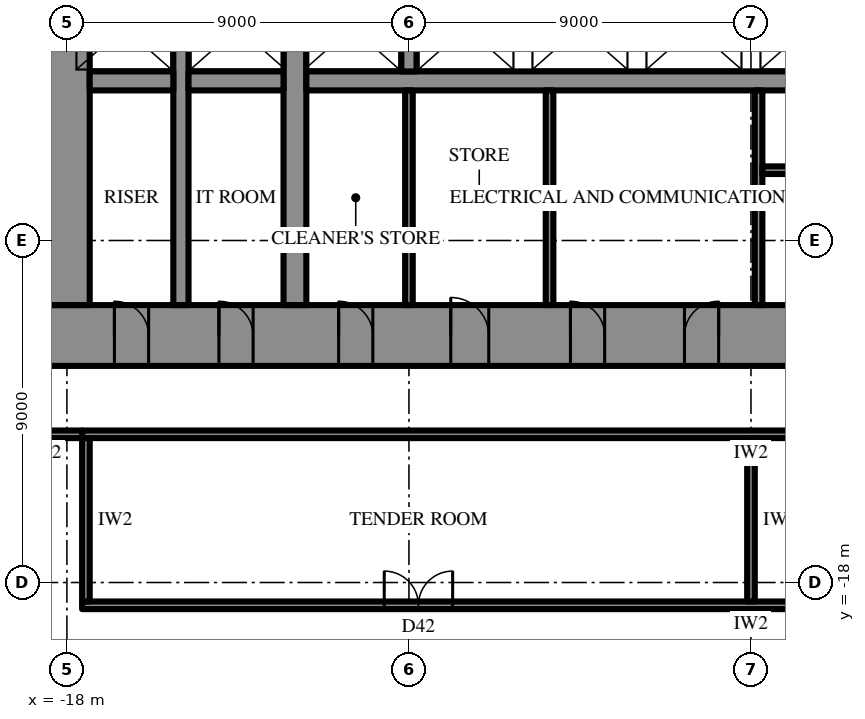
"""IFC4 building model, lengths in metres.
Left out: names, types, materials, properties, quantities, classifications, styles, units other than length and angle.
Written with IfcOpenShell. Run it as: python <this file> out.ifc"""

import sys

from ifc_helpers import new_model, si_unit, direction, frame, frame_2d, origin, place, context, subcontext, project, spatial, rectangle, extrude, element, fill, save


model = new_model("IFC4")
c1 = context("Model", 3, precision=1e-05, world=origin(), true_north=direction((0.0, 1.0)))
c2 = subcontext(c1, "Body", "Model", "MODEL_VIEW")
j1 = project(units=[si_unit("LENGTHUNIT", "METRE"), si_unit("PLANEANGLEUNIT", "RADIAN")], contexts=[c1])
p1 = place(None, origin())
s1 = spatial("IfcSite", under=j1, at=p1, CompositionType="ELEMENT")
p2 = place(p1, origin())
s2 = spatial("IfcBuilding", under=s1, at=p2, CompositionType="ELEMENT")
p3 = place(p2, frame((0.0, 0.0, 69.7)))
s3 = spatial("IfcBuildingStorey", under=s2, at=p3, CompositionType="ELEMENT", Elevation=69.7)
p4 = place(p3, frame((18.6, -11.5, 0.0), z_axis=(0.0, 0.0, 1.0), x_axis=(-1.0, 0.0, 0.0)))
e1 = element("IfcWall", 1, at=p4, inside=s3, PredefinedType="SHEAR", context=c2, shape_type="SweptSolid", body=[
    extrude(rectangle(XDim=37.2, YDim=1.6, at=frame_2d((18.6, 0.0))), origin(), (0.0, 0.0, 1.0), 4.2),
])
p5 = place(p4, frame((19.45, 0.0, 0.0)))
e2 = element("IfcOpeningElement", 2, at=p5, cuts=e1, PredefinedType="OPENING", context=c2, shape_type="SweptSolid", body=[
    extrude(rectangle(XDim=0.9, YDim=2.2, at=frame_2d((0.45, 1.1))), frame((0.0, 0.81, 0.0), z_axis=(0.0, -1.0, 0.0), x_axis=(1.0, 0.0, 0.0)), (0.0, 0.0, 1.0), 1.62),
])
p6 = place(p4, frame((22.45, 0.0, 0.0)))
e3 = element("IfcOpeningElement", 3, at=p6, cuts=e1, PredefinedType="OPENING", context=c2, shape_type="SweptSolid", body=[
    extrude(rectangle(XDim=0.9, YDim=2.2, at=frame_2d((0.45, 1.1))), frame((0.0, 0.81, 0.0), z_axis=(0.0, -1.0, 0.0), x_axis=(1.0, 0.0, 0.0)), (0.0, 0.0, 1.0), 1.62),
])
p7 = place(p4, frame((25.5, 0.0, 0.0)))
e4 = element("IfcOpeningElement", 4, at=p7, cuts=e1, PredefinedType="OPENING", context=c2, shape_type="SweptSolid", body=[
    extrude(rectangle(XDim=1.0, YDim=2.2, at=frame_2d((0.5, 1.1))), frame((0.0, 0.81, 0.0), z_axis=(0.0, -1.0, 0.0), x_axis=(1.0, 0.0, 0.0)), (0.0, 0.0, 1.0), 1.62),
])
p8 = place(p4, frame((1.85, 0.0, 0.0)))
e5 = element("IfcOpeningElement", 5, at=p8, cuts=e1, PredefinedType="OPENING", context=c2, shape_type="SweptSolid", body=[
    extrude(rectangle(XDim=0.9, YDim=2.2, at=frame_2d((0.45, 1.1))), frame((0.0, 0.81, 0.0), z_axis=(0.0, -1.0, 0.0), x_axis=(1.0, 0.0, 0.0)), (0.0, 0.0, 1.0), 1.62),
])
p9 = place(p4, frame((4.6, 0.0, 0.0)))
e6 = element("IfcOpeningElement", 6, at=p9, cuts=e1, PredefinedType="OPENING", context=c2, shape_type="SweptSolid", body=[
    extrude(rectangle(XDim=0.9, YDim=2.2, at=frame_2d((0.45, 1.1))), frame((0.0, 0.81, 0.0), z_axis=(0.0, -1.0, 0.0), x_axis=(1.0, 0.0, 0.0)), (0.0, 0.0, 1.0), 1.62),
])
p10 = place(p4, frame((7.75, 0.0, 0.0)))
e7 = element("IfcOpeningElement", 7, at=p10, cuts=e1, PredefinedType="OPENING", context=c2, shape_type="SweptSolid", body=[
    extrude(rectangle(XDim=0.9, YDim=2.2, at=frame_2d((0.45, 1.1))), frame((0.0, 0.81, 0.0), z_axis=(0.0, -1.0, 0.0), x_axis=(1.0, 0.0, 0.0)), (0.0, 0.0, 1.0), 1.62),
])
p11 = place(p4, frame((28.55, 0.0, 0.0)))
e8 = element("IfcOpeningElement", 8, at=p11, cuts=e1, PredefinedType="OPENING", context=c2, shape_type="SweptSolid", body=[
    extrude(rectangle(XDim=0.9, YDim=2.2, at=frame_2d((0.45, 1.1))), frame((0.0, 0.81, 0.0), z_axis=(0.0, -1.0, 0.0), x_axis=(1.0, 0.0, 0.0)), (0.0, 0.0, 1.0), 1.62),
])
p12 = place(p4, frame((31.7, 0.0, 0.0)))
e9 = element("IfcOpeningElement", 9, at=p12, cuts=e1, PredefinedType="OPENING", context=c2, shape_type="SweptSolid", body=[
    extrude(rectangle(XDim=0.9, YDim=2.2, at=frame_2d((0.45, 1.1))), frame((0.0, 0.81, 0.0), z_axis=(0.0, -1.0, 0.0), x_axis=(1.0, 0.0, 0.0)), (0.0, 0.0, 1.0), 1.62),
])
p13 = place(p4, frame((34.45, 0.0, 0.0)))
e10 = element("IfcOpeningElement", 10, at=p13, cuts=e1, PredefinedType="OPENING", context=c2, shape_type="SweptSolid", body=[
    extrude(rectangle(XDim=0.9, YDim=2.2, at=frame_2d((0.45, 1.1))), frame((0.0, 0.81, 0.0), z_axis=(0.0, -1.0, 0.0), x_axis=(1.0, 0.0, 0.0)), (0.0, 0.0, 1.0), 1.62),
])
p14 = place(p3, frame((-18.0, 10.7, 0.0), z_axis=(0.0, 0.0, 1.0), x_axis=(0.0, -1.0, 0.0)))
e11 = element("IfcWall", 11, at=p14, inside=s3, PredefinedType="SHEAR", context=c2, shape_type="SweptSolid", body=[
    extrude(rectangle(XDim=21.4, YDim=1.2, at=frame_2d((10.7, 0.0))), origin(), (0.0, 0.0, 1.0), 4.2),
])
p15 = place(p14, frame((9.8, 0.0, 0.0)))
e12 = element("IfcOpeningElement", 12, at=p15, cuts=e11, PredefinedType="OPENING", context=c2, shape_type="SweptSolid", body=[
    extrude(rectangle(XDim=1.8, YDim=2.4, at=frame_2d((0.9, 1.2))), frame((0.0, 0.61, 0.0), z_axis=(0.0, -1.0, 0.0), x_axis=(1.0, 0.0, 0.0)), (0.0, 0.0, 1.0), 1.22),
])
p16 = place(p3, frame((-12.0, -10.7, 0.0), z_axis=(0.0, 0.0, 1.0), x_axis=(0.0, 1.0, 0.0)))
e13 = element("IfcWall", 13, at=p16, inside=s3, PredefinedType="SHEAR", context=c2, shape_type="SweptSolid", body=[
    extrude(rectangle(XDim=21.4, YDim=0.6, at=frame_2d((10.7, 0.0))), origin(), (0.0, 0.0, 1.0), 4.2),
])
p17 = place(p16, frame((9.8, 0.0, 0.0)))
e14 = element("IfcOpeningElement", 14, at=p17, cuts=e13, PredefinedType="OPENING", context=c2, shape_type="SweptSolid", body=[
    extrude(rectangle(XDim=1.8, YDim=2.4, at=frame_2d((0.9, 1.2))), frame((0.0, 0.31, 0.0), z_axis=(0.0, -1.0, 0.0), x_axis=(1.0, 0.0, 0.0)), (0.0, 0.0, 1.0), 0.62),
])
p18 = place(p3, frame((-15.0, -10.7, 0.0), z_axis=(0.0, 0.0, 1.0), x_axis=(0.0, 1.0, 0.0)))
e15 = element("IfcWall", 15, at=p18, inside=s3, PredefinedType="SHEAR", context=c2, shape_type="SweptSolid", body=[
    extrude(rectangle(XDim=21.4, YDim=0.4, at=frame_2d((10.7, 0.0))), origin(), (0.0, 0.0, 1.0), 4.2),
])
p19 = place(p18, frame((9.8, 0.0, 0.0)))
e16 = element("IfcOpeningElement", 16, at=p19, cuts=e15, PredefinedType="OPENING", context=c2, shape_type="SweptSolid", body=[
    extrude(rectangle(XDim=1.8, YDim=2.4, at=frame_2d((0.9, 1.2))), frame((0.0, 0.21, 0.0), z_axis=(0.0, -1.0, 0.0), x_axis=(1.0, 0.0, 0.0)), (0.0, 0.0, 1.0), 0.42),
])
p20 = place(p3, frame((11.7, -4.8, 0.0), z_axis=(0.0, 0.0, 1.0), x_axis=(-1.0, 0.0, 0.0)))
e17 = element("IfcWall", 17, at=p20, inside=s3, PredefinedType="SHEAR", context=c2, shape_type="SweptSolid", body=[
    extrude(rectangle(XDim=23.4, YDim=0.5, at=frame_2d((11.7, 0.0))), origin(), (0.0, 0.0, 1.0), 4.2),
])
p21 = place(p20, frame((6.6, 0.0, 0.0)))
e18 = element("IfcOpeningElement", 18, at=p21, cuts=e17, PredefinedType="OPENING", context=c2, shape_type="SweptSolid", body=[
    extrude(rectangle(XDim=1.2, YDim=2.2, at=frame_2d((0.6, 1.1))), frame((0.0, 0.26, 0.0), z_axis=(0.0, -1.0, 0.0), x_axis=(1.0, 0.0, 0.0)), (0.0, 0.0, 1.0), 0.52),
])
p22 = place(p20, frame((3.6, 0.0, 0.0)))
e19 = element("IfcOpeningElement", 19, at=p22, cuts=e17, PredefinedType="OPENING", context=c2, shape_type="SweptSolid", body=[
    extrude(rectangle(XDim=1.2, YDim=2.2, at=frame_2d((0.6, 1.1))), frame((0.0, 0.26, 0.0), z_axis=(0.0, -1.0, 0.0), x_axis=(1.0, 0.0, 0.0)), (0.0, 0.0, 1.0), 0.52),
])
p23 = place(p3, frame((-12.3, -4.8, 0.0), z_axis=(0.0, 0.0, 1.0), x_axis=(-1.0, 0.0, 0.0)))
e20 = element("IfcWall", 20, at=p23, inside=s3, PredefinedType="SHEAR", context=c2, shape_type="SweptSolid", body=[
    extrude(rectangle(XDim=2.5, YDim=0.5, at=frame_2d((1.25, 0.0))), origin(), (0.0, 0.0, 1.0), 4.2),
])
p24 = place(p3, frame((-15.2, -4.8, 0.0), z_axis=(0.0, 0.0, 1.0), x_axis=(-1.0, 0.0, 0.0)))
e21 = element("IfcWall", 21, at=p24, inside=s3, PredefinedType="SHEAR", context=c2, shape_type="SweptSolid", body=[
    extrude(rectangle(XDim=2.2, YDim=0.5, at=frame_2d((1.1, 0.0))), origin(), (0.0, 0.0, 1.0), 4.2),
])
p25 = place(p3, frame((-9.0, -2.25, 0.0), z_axis=(0.0, 0.0, 1.0), x_axis=(0.0, -1.0, 0.0)))
e22 = element("IfcWall", 22, at=p25, inside=s3, PredefinedType="SHEAR", context=c2, shape_type="SweptSolid", body=[
    extrude(rectangle(XDim=2.3, YDim=0.4, at=frame_2d((1.15, 0.0))), origin(), (0.0, 0.0, 1.0), 4.2),
])
p26 = place(p3, frame((0.2, -5.05, 0.0), z_axis=(0.0, 0.0, 1.0), x_axis=(0.0, -1.0, 0.0)))
e23 = element("IfcWall", 23, at=p26, inside=s3, PredefinedType="SHEAR", context=c2, shape_type="SweptSolid", body=[
    extrude(rectangle(XDim=5.65, YDim=0.2, at=frame_2d((2.825, 0.0))), origin(), (0.0, 0.0, 1.0), 4.2),
])
p27 = place(p3, frame((8.9, -7.15, 0.0), z_axis=(0.0, 0.0, 1.0), x_axis=(-1.0, 0.0, 0.0)))
e24 = element("IfcWall", 24, at=p27, inside=s3, PredefinedType="SHEAR", context=c2, shape_type="SweptSolid", body=[
    extrude(rectangle(XDim=8.6, YDim=0.2, at=frame_2d((4.3, 0.0))), origin(), (0.0, 0.0, 1.0), 4.2),
])
p28 = place(p27, frame((0.3, 0.0, 0.0)))
e25 = element("IfcOpeningElement", 25, at=p28, cuts=e24, PredefinedType="OPENING", context=c2, shape_type="SweptSolid", body=[
    extrude(rectangle(XDim=1.0, YDim=2.2, at=frame_2d((0.5, 1.1))), frame((0.0, 0.11, 0.0), z_axis=(0.0, -1.0, 0.0), x_axis=(1.0, 0.0, 0.0)), (0.0, 0.0, 1.0), 0.22),
])
for number, where, z_axis, x_axis in (
    (26, (-9.0, -5.05, 0.0), (0.0, 0.0, 1.0), (0.0, -1.0, 0.0)),
    (27, (-5.3, -5.05, 0.0), (0.0, 0.0, 1.0), (0.0, -1.0, 0.0)),
):
    element("IfcWall", number, at=place(p3, frame(where, z_axis=z_axis, x_axis=x_axis)), inside=s3, PredefinedType="PARTITIONING", context=c2, shape_type="SweptSolid", body=[
        extrude(rectangle(XDim=5.65, YDim=0.2, at=frame_2d((2.825, 0.0))), origin(), (0.0, 0.0, 1.0), 4.0),
    ])
p29 = place(p3, frame((17.6, -14.1, 0.0), z_axis=(0.0, 0.0, 1.0), x_axis=(-1.0, 0.0, 0.0)))
e28 = element("IfcWall", 28, at=p29, inside=s3, PredefinedType="PARTITIONING", context=c2, shape_type="SweptSolid", body=[
    extrude(rectangle(XDim=35.2, YDim=0.2, at=frame_2d((17.6, 0.0))), origin(), (0.0, 0.0, 1.0), 4.0),
])
p30 = place(p3, frame((17.6, -18.6, 0.0), z_axis=(0.0, 0.0, 1.0), x_axis=(-1.0, 0.0, 0.0)))
e29 = element("IfcWall", 29, at=p30, inside=s3, PredefinedType="PARTITIONING", context=c2, shape_type="SweptSolid", body=[
    extrude(rectangle(XDim=35.2, YDim=0.2, at=frame_2d((17.6, 0.0))), origin(), (0.0, 0.0, 1.0), 4.0),
])
p31 = place(p30, frame((7.95, 0.0, 0.0)))
e30 = element("IfcOpeningElement", 30, at=p31, cuts=e29, PredefinedType="OPENING", context=c2, shape_type="SweptSolid", body=[
    extrude(rectangle(XDim=1.8, YDim=2.4, at=frame_2d((0.9, 1.2))), frame((0.0, 0.11, 0.0), z_axis=(0.0, -1.0, 0.0), x_axis=(1.0, 0.0, 0.0)), (0.0, 0.0, 1.0), 0.22),
])
p32 = place(p30, frame((25.45, 0.0, 0.0)))
e31 = element("IfcOpeningElement", 31, at=p32, cuts=e29, PredefinedType="OPENING", context=c2, shape_type="SweptSolid", body=[
    extrude(rectangle(XDim=1.8, YDim=2.4, at=frame_2d((0.9, 1.2))), frame((0.0, 0.11, 0.0), z_axis=(0.0, -1.0, 0.0), x_axis=(1.0, 0.0, 0.0)), (0.0, 0.0, 1.0), 0.22),
])
p33 = place(p3, frame((0.0, -14.2, 0.0), z_axis=(0.0, 0.0, 1.0), x_axis=(0.0, -1.0, 0.0)))
e32 = element("IfcWall", 32, at=p33, inside=s3, PredefinedType="PARTITIONING", context=c2, shape_type="SweptSolid", body=[
    extrude(rectangle(XDim=4.3, YDim=0.2, at=frame_2d((2.15, 0.0))), origin(), (0.0, 0.0, 1.0), 2.944),
])
p34 = place(p3, frame((-17.5, -14.2, 0.0), z_axis=(0.0, 0.0, 1.0), x_axis=(0.0, -1.0, 0.0)))
e33 = element("IfcWall", 33, at=p34, inside=s3, PredefinedType="PARTITIONING", context=c2, shape_type="SweptSolid", body=[
    extrude(rectangle(XDim=4.3, YDim=0.2, at=frame_2d((2.15, 0.0))), origin(), (0.0, 0.0, 1.0), 4.0),
])
p35 = place(p3, frame((-17.6, -14.1, 0.0), z_axis=(0.0, 0.0, 1.0), x_axis=(-1.0, 0.0, 0.0)))
e34 = element("IfcWall", 34, at=p35, inside=s3, PredefinedType="PARTITIONING", context=c2, shape_type="SweptSolid", body=[
    extrude(rectangle(XDim=2.0, YDim=0.2, at=frame_2d((1.0, 0.0))), origin(), (0.0, 0.0, 1.0), 4.0),
])
p36 = place(p5, frame((0.9, 0.0, 0.0), z_axis=(0.0, 0.0, 1.0), x_axis=(-1.0, 0.0, 0.0)))
e35 = element("IfcDoor", 35, at=p36, inside=s3, OperationType="SINGLE_SWING_LEFT", PredefinedType="DOOR", context=c2, shape_type="SweptSolid", body=[
    extrude(rectangle(XDim=0.9, YDim=2.2, at=frame_2d((0.45, 1.1))), frame((0.0, 0.025, 0.0), z_axis=(0.0, -1.0, 0.0), x_axis=(1.0, 0.0, 0.0)), (0.0, 0.0, 1.0), 0.05),
])
fill(e2, e35)
p37 = place(p6, frame((0.9, 0.0, 0.0), z_axis=(0.0, 0.0, 1.0), x_axis=(-1.0, 0.0, 0.0)))
e36 = element("IfcDoor", 36, at=p37, inside=s3, OperationType="SINGLE_SWING_RIGHT", PredefinedType="DOOR", context=c2, shape_type="SweptSolid", body=[
    extrude(rectangle(XDim=0.9, YDim=2.2, at=frame_2d((0.45, 1.1))), frame((0.0, 0.025, 0.0), z_axis=(0.0, -1.0, 0.0), x_axis=(1.0, 0.0, 0.0)), (0.0, 0.0, 1.0), 0.05),
])
fill(e3, e36)
p38 = place(p7, frame((1.0, 0.0, 0.0), z_axis=(0.0, 0.0, 1.0), x_axis=(-1.0, 0.0, 0.0)))
e37 = element("IfcDoor", 37, at=p38, inside=s3, OperationType="SINGLE_SWING_RIGHT", PredefinedType="DOOR", context=c2, shape_type="SweptSolid", body=[
    extrude(rectangle(XDim=1.0, YDim=2.2, at=frame_2d((0.5, 1.1))), frame((0.0, 0.025, 0.0), z_axis=(0.0, -1.0, 0.0), x_axis=(1.0, 0.0, 0.0)), (0.0, 0.0, 1.0), 0.05),
])
fill(e4, e37)
p39 = place(p11, frame((0.9, 0.0, 0.0), z_axis=(0.0, 0.0, 1.0), x_axis=(-1.0, 0.0, 0.0)))
e38 = element("IfcDoor", 38, at=p39, inside=s3, OperationType="SINGLE_SWING_RIGHT", PredefinedType="DOOR", context=c2, shape_type="SweptSolid", body=[
    extrude(rectangle(XDim=0.9, YDim=2.2, at=frame_2d((0.45, 1.1))), frame((0.0, 0.025, 0.0), z_axis=(0.0, -1.0, 0.0), x_axis=(1.0, 0.0, 0.0)), (0.0, 0.0, 1.0), 0.05),
])
fill(e8, e38)
p40 = place(p12, frame((0.9, 0.0, 0.0), z_axis=(0.0, 0.0, 1.0), x_axis=(-1.0, 0.0, 0.0)))
e39 = element("IfcDoor", 39, at=p40, inside=s3, OperationType="SINGLE_SWING_RIGHT", PredefinedType="DOOR", context=c2, shape_type="SweptSolid", body=[
    extrude(rectangle(XDim=0.9, YDim=2.2, at=frame_2d((0.45, 1.1))), frame((0.0, 0.025, 0.0), z_axis=(0.0, -1.0, 0.0), x_axis=(1.0, 0.0, 0.0)), (0.0, 0.0, 1.0), 0.05),
])
fill(e9, e39)
p41 = place(p13, frame((0.9, 0.0, 0.0), z_axis=(0.0, 0.0, 1.0), x_axis=(-1.0, 0.0, 0.0)))
e40 = element("IfcDoor", 40, at=p41, inside=s3, OperationType="SINGLE_SWING_RIGHT", PredefinedType="DOOR", context=c2, shape_type="SweptSolid", body=[
    extrude(rectangle(XDim=0.9, YDim=2.2, at=frame_2d((0.45, 1.1))), frame((0.0, 0.025, 0.0), z_axis=(0.0, -1.0, 0.0), x_axis=(1.0, 0.0, 0.0)), (0.0, 0.0, 1.0), 0.05),
])
fill(e10, e40)
p42 = place(p32, frame((1.8, 0.0, 0.0), z_axis=(0.0, 0.0, 1.0), x_axis=(-1.0, 0.0, 0.0)))
e41 = element("IfcDoor", 41, at=p42, inside=s3, OperationType="DOUBLE_DOOR_SINGLE_SWING", PredefinedType="DOOR", context=c2, shape_type="SweptSolid", body=[
    extrude(rectangle(XDim=1.8, YDim=2.4, at=frame_2d((0.9, 1.2))), frame((0.0, 0.025, 0.0), z_axis=(0.0, -1.0, 0.0), x_axis=(1.0, 0.0, 0.0)), (0.0, 0.0, 1.0), 0.05),
])
fill(e31, e41)
save(model, sys.argv[1])
